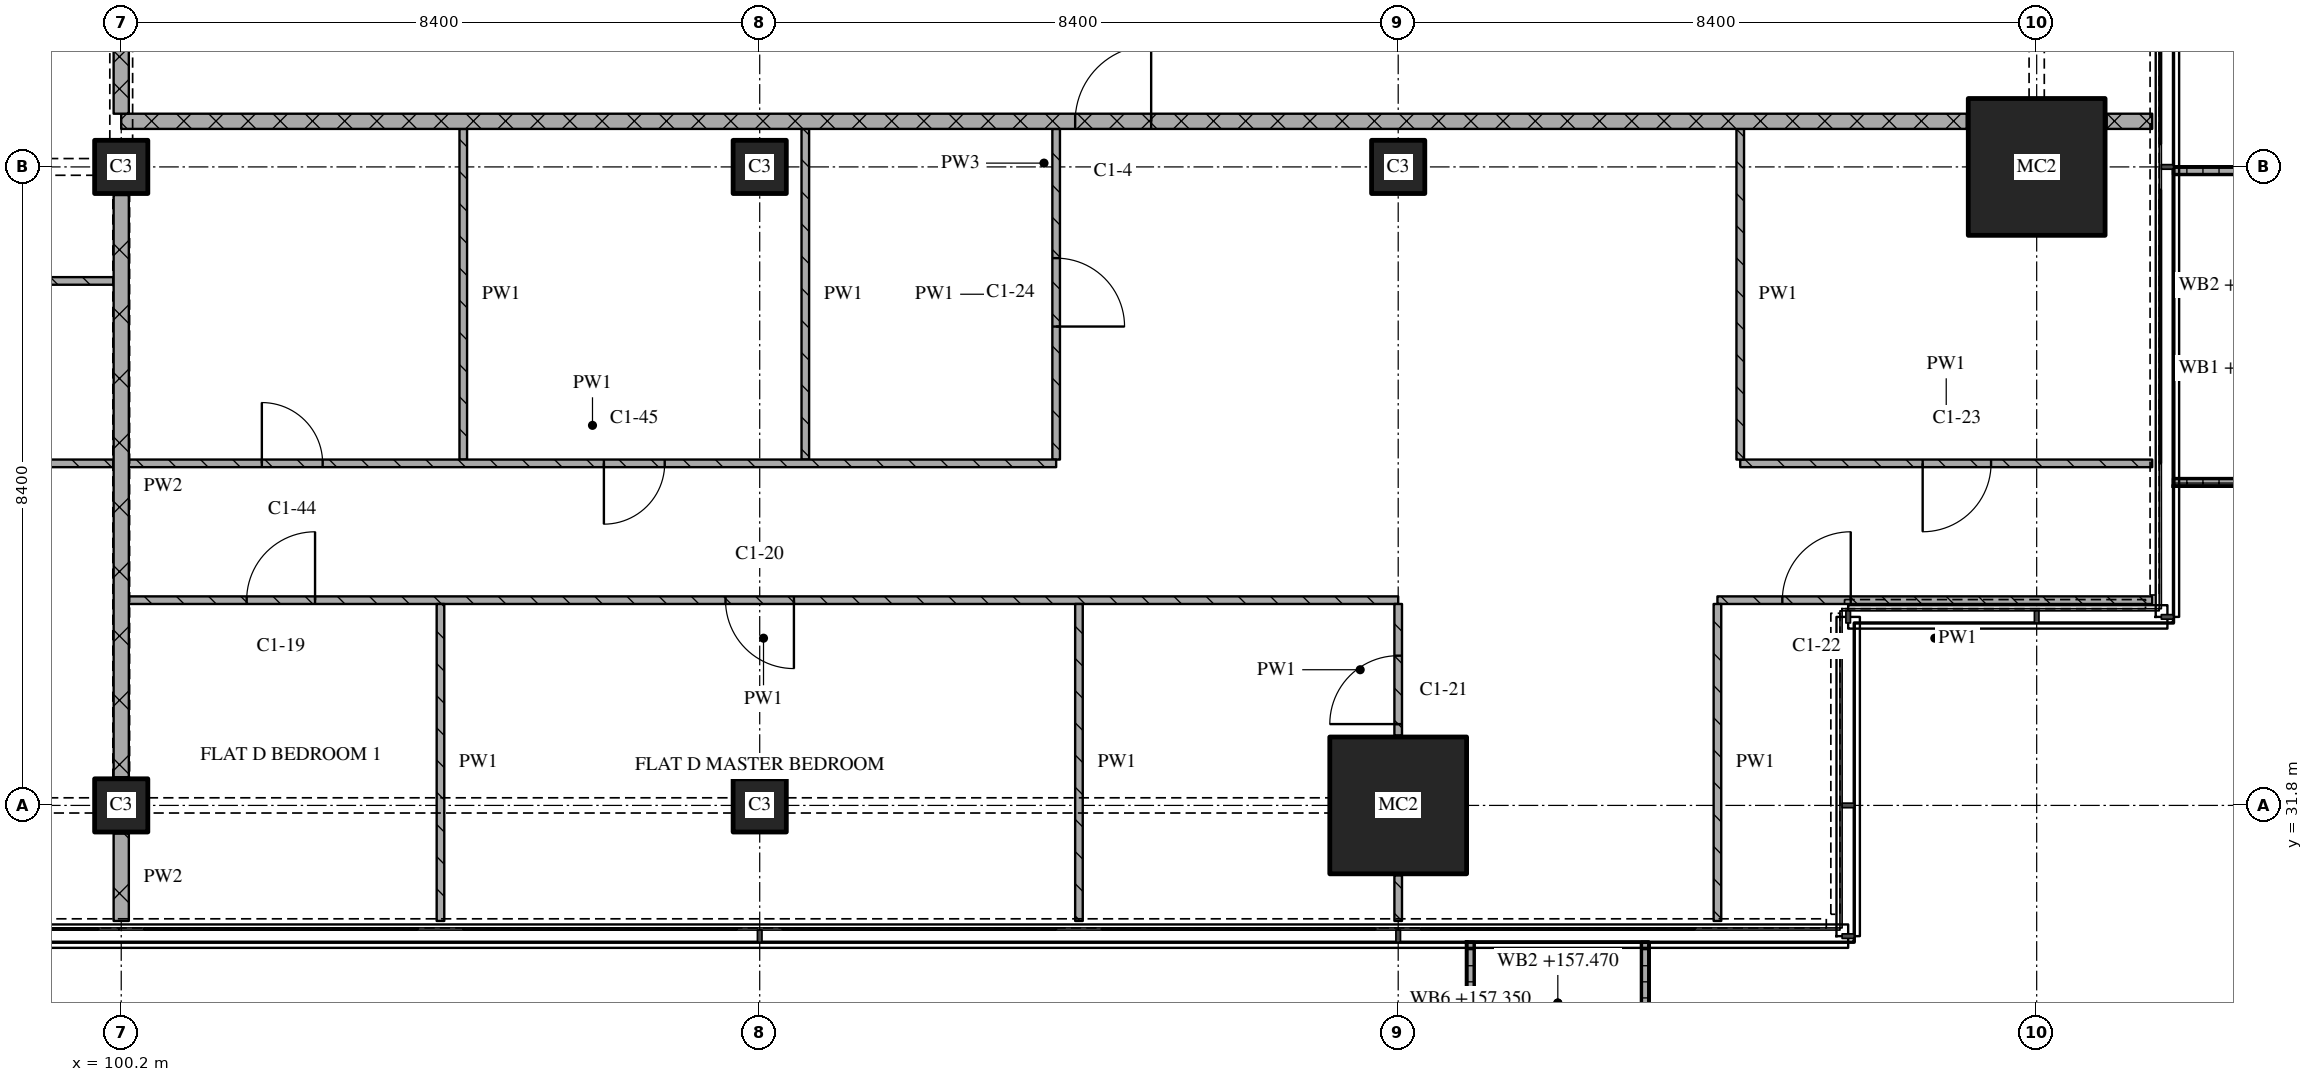
"""IFC4 building model, lengths in metres.
Left out: names, types, materials, properties, quantities, classifications, styles, units other than length and angle.
Written with IfcOpenShell. Run it as: python <this file> out.ifc"""

import sys

from ifc_helpers import new_model, si_unit, direction, frame, frame_2d, origin, origin_2d, place, context, subcontext, project, spatial, polyline, rectangle, outline, extrude, element, fill, save


model = new_model("IFC4")
c1 = context("Model", 3, precision=1e-05, world=origin(), true_north=direction((0.0, 1.0)))
c2 = subcontext(c1, "Body", "Model", "MODEL_VIEW")
j1 = project(units=[si_unit("LENGTHUNIT", "METRE"), si_unit("PLANEANGLEUNIT", "RADIAN")], contexts=[c1])
p1 = place(None, origin())
s1 = spatial("IfcSite", under=j1, at=p1, CompositionType="ELEMENT")
p2 = place(p1, origin())
s2 = spatial("IfcBuilding", under=s1, at=p2, CompositionType="ELEMENT")
p3 = place(p2, frame((0.0, 0.0, 154.65)))
s3 = spatial("IfcBuildingStorey", under=s2, at=p3, CompositionType="ELEMENT", Elevation=154.65)
for number, where, z_axis, x_axis in (
    (1, (100.2, 31.8, 0.0), (0.0, 0.0, 1.0), (1.0, 0.0, 0.0)),
    (2, (100.2, 40.2, 0.0), (0.0, 0.0, 1.0), (1.0, 0.0, 0.0)),
    (3, (108.6, 31.8, 0.0), (0.0, 0.0, 1.0), (1.0, 0.0, 0.0)),
    (4, (108.6, 40.2, 0.0), (0.0, 0.0, 1.0), (1.0, 0.0, 0.0)),
):
    element("IfcColumn", number, at=place(p3, frame(where, z_axis=z_axis, x_axis=x_axis)), inside=s3, PredefinedType="COLUMN", context=c2, shape_type="SweptSolid", body=[
        extrude(rectangle(XDim=0.7, YDim=0.7, at=origin_2d()), origin(), (0.0, 0.0, 1.0), 3.6),
    ])
p4 = place(p3, frame((117.0, 31.8, 0.0), z_axis=(0.0, 0.0, 1.0), x_axis=(1.0, 0.0, 0.0)))
e5 = element("IfcColumn", 5, at=p4, inside=s3, PredefinedType="COLUMN", context=c2, shape_type="SweptSolid", body=[
    extrude(rectangle(XDim=1.8, YDim=1.8, at=origin_2d()), origin(), (0.0, 0.0, 1.0), 3.6),
])
p5 = place(p3, frame((117.0, 40.2, 0.0), z_axis=(0.0, 0.0, 1.0), x_axis=(1.0, 0.0, 0.0)))
e6 = element("IfcColumn", 6, at=p5, inside=s3, PredefinedType="COLUMN", context=c2, shape_type="SweptSolid", body=[
    extrude(rectangle(XDim=0.7, YDim=0.7, at=origin_2d()), origin(), (0.0, 0.0, 1.0), 3.6),
])
p6 = place(p3, frame((125.4, 40.2, 0.0), z_axis=(0.0, 0.0, 1.0), x_axis=(1.0, 0.0, 0.0)))
e7 = element("IfcColumn", 7, at=p6, inside=s3, PredefinedType="COLUMN", context=c2, shape_type="SweptSolid", body=[
    extrude(rectangle(XDim=1.8, YDim=1.8, at=origin_2d()), origin(), (0.0, 0.0, 1.0), 3.6),
])
p7 = place(p3, origin())
e8 = element("IfcWall", 8, at=p7, inside=s3, PredefinedType="SOLIDWALL", context=c2, shape_type="SweptSolid", body=[
    extrude(outline(polyline([(117.9, 30.0), (118.0, 30.0), (118.0, 28.5), (120.2, 28.5), (120.2, 30.0), (120.3, 30.0), (120.3, 28.4), (117.9, 28.4), (117.9, 30.0)])), origin(), (0.0, 0.0, 1.0), 1.0),
])
p8 = place(p3, origin())
e9 = element("IfcWall", 9, at=p8, inside=s3, PredefinedType="SOLIDWALL", context=c2, shape_type="SweptSolid", body=[
    extrude(outline(polyline([(127.2, 36.0), (127.2, 36.1), (128.833, 36.1), (128.833, 40.1), (127.2, 40.1), (127.2, 40.2), (128.933, 40.2), (128.933, 36.0), (127.2, 36.0)])), origin(), (0.0, 0.0, 1.0), 1.0),
])
p9 = place(p3, frame((117.0, 34.5, 0.0), z_axis=(0.0, 0.0, 1.0), x_axis=(-1.0, 0.0, 0.0)))
e10 = element("IfcWall", 10, at=p9, inside=s3, PredefinedType="PARTITIONING", context=c2, shape_type="SweptSolid", body=[
    extrude(rectangle(XDim=16.7, YDim=0.1, at=frame_2d((8.35, 0.0))), origin(), (0.0, 0.0, 1.0), 3.32),
])
p10 = place(p9, frame((7.95, 0.0, 0.0)))
e11 = element("IfcOpeningElement", 11, at=p10, cuts=e10, PredefinedType="OPENING", context=c2, shape_type="SweptSolid", body=[
    extrude(rectangle(XDim=0.9, YDim=2.1, at=frame_2d((0.45, 1.05))), frame((0.0, 0.06, 0.0), z_axis=(0.0, -1.0, 0.0), x_axis=(1.0, 0.0, 0.0)), (0.0, 0.0, 1.0), 0.12),
])
p11 = place(p9, frame((14.25, 0.0, 0.0)))
e12 = element("IfcOpeningElement", 12, at=p11, cuts=e10, PredefinedType="OPENING", context=c2, shape_type="SweptSolid", body=[
    extrude(rectangle(XDim=0.9, YDim=2.1, at=frame_2d((0.45, 1.05))), frame((0.0, 0.06, 0.0), z_axis=(0.0, -1.0, 0.0), x_axis=(1.0, 0.0, 0.0)), (0.0, 0.0, 1.0), 0.12),
])
p12 = place(p3, frame((126.92, 34.5, 0.0), z_axis=(0.0, 0.0, 1.0), x_axis=(-1.0, 0.0, 0.0)))
e13 = element("IfcWall", 13, at=p12, inside=s3, PredefinedType="PARTITIONING", context=c2, shape_type="SweptSolid", body=[
    extrude(rectangle(XDim=5.72, YDim=0.1, at=frame_2d((2.86, 0.0))), origin(), (0.0, 0.0, 1.0), 3.32),
])
p13 = place(p12, frame((3.966, 0.0, 0.0)))
e14 = element("IfcOpeningElement", 14, at=p13, cuts=e13, PredefinedType="OPENING", context=c2, shape_type="SweptSolid", body=[
    extrude(rectangle(XDim=0.9, YDim=2.1, at=frame_2d((0.45, 1.05))), frame((0.0, 0.06, 0.0), z_axis=(0.0, -1.0, 0.0), x_axis=(1.0, 0.0, 0.0)), (0.0, 0.0, 1.0), 0.12),
])
p14 = place(p3, frame((121.5, 36.3, 0.0), z_axis=(0.0, 0.0, 1.0), x_axis=(1.0, 0.0, 0.0)))
e15 = element("IfcWall", 15, at=p14, inside=s3, PredefinedType="PARTITIONING", context=c2, shape_type="SweptSolid", body=[
    extrude(rectangle(XDim=5.42, YDim=0.1, at=frame_2d((2.71, 0.0))), origin(), (0.0, 0.0, 1.0), 3.32),
])
p15 = place(p14, frame((2.4, 0.0, 0.0)))
e16 = element("IfcOpeningElement", 16, at=p15, cuts=e15, PredefinedType="OPENING", context=c2, shape_type="SweptSolid", body=[
    extrude(rectangle(XDim=0.9, YDim=2.1, at=frame_2d((0.45, 1.05))), frame((0.0, 0.06, 0.0), z_axis=(0.0, -1.0, 0.0), x_axis=(1.0, 0.0, 0.0)), (0.0, 0.0, 1.0), 0.12),
])
p16 = place(p3, frame((93.0, 38.7, 0.0), z_axis=(0.0, 0.0, 1.0), x_axis=(1.0, 0.0, 0.0)))
e17 = element("IfcWall", 17, at=p16, inside=s3, PredefinedType="PARTITIONING", context=c2, shape_type="SweptSolid", body=[
    extrude(rectangle(XDim=7.1, YDim=0.1, at=frame_2d((3.55, 0.0))), origin(), (0.0, 0.0, 1.0), 3.32),
])
p17 = place(p16, frame((5.45, 0.0, 0.0)))
e18 = element("IfcOpeningElement", 18, at=p17, cuts=e17, PredefinedType="OPENING", context=c2, shape_type="SweptSolid", body=[
    extrude(rectangle(XDim=0.8, YDim=2.1, at=frame_2d((0.4, 1.05))), frame((0.0, 0.06, 0.0), z_axis=(0.0, -1.0, 0.0), x_axis=(1.0, 0.0, 0.0)), (0.0, 0.0, 1.0), 0.12),
])
p18 = place(p3, frame((124.48, 40.8, 0.0), z_axis=(0.0, 0.0, 1.0), x_axis=(-1.0, 0.0, 0.0)))
e19 = element("IfcWall", 19, at=p18, inside=s3, PredefinedType="PARTITIONING", context=c2, shape_type="SweptSolid", body=[
    extrude(rectangle(XDim=24.28, YDim=0.2, at=frame_2d((12.14, 0.0))), origin(), (0.0, 0.0, 1.0), 3.32),
])
p19 = place(p18, frame((10.73, 0.0, 0.0)))
e20 = element("IfcOpeningElement", 20, at=p19, cuts=e19, PredefinedType="OPENING", context=c2, shape_type="SweptSolid", body=[
    extrude(rectangle(XDim=1.0, YDim=2.1, at=frame_2d((0.5, 1.05))), frame((0.0, 0.11, 0.0), z_axis=(0.0, -1.0, 0.0), x_axis=(1.0, 0.0, 0.0)), (0.0, 0.0, 1.0), 0.22),
])
p20 = place(p3, frame((126.32, 40.8, 0.0), z_axis=(0.0, 0.0, 1.0), x_axis=(1.0, 0.0, 0.0)))
e21 = element("IfcWall", 21, at=p20, inside=s3, PredefinedType="PARTITIONING", context=c2, shape_type="SweptSolid", body=[
    extrude(rectangle(XDim=0.6, YDim=0.2, at=frame_2d((0.3, 0.0))), origin(), (0.0, 0.0, 1.0), 3.32),
])
p21 = place(p3, frame((100.2, 43.1, 0.0), z_axis=(0.0, 0.0, 1.0), x_axis=(0.0, -1.0, 0.0)))
e22 = element("IfcWall", 22, at=p21, inside=s3, PredefinedType="PARTITIONING", context=c2, shape_type="SweptSolid", body=[
    extrude(rectangle(XDim=2.2, YDim=0.2, at=frame_2d((1.1, 0.0))), origin(), (0.0, 0.0, 1.0), 2.43),
])
p22 = place(p3, frame((100.2, 31.43, 0.0), z_axis=(0.0, 0.0, 1.0), x_axis=(0.0, -1.0, 0.0)))
e23 = element("IfcWall", 23, at=p22, inside=s3, PredefinedType="PARTITIONING", context=c2, shape_type="SweptSolid", body=[
    extrude(rectangle(XDim=1.15, YDim=0.2, at=frame_2d((0.575, 0.0))), origin(), (0.0, 0.0, 1.0), 3.32),
])
p23 = place(p3, frame((100.2, 39.83, 0.0), z_axis=(0.0, 0.0, 1.0), x_axis=(0.0, -1.0, 0.0)))
e24 = element("IfcWall", 24, at=p23, inside=s3, PredefinedType="PARTITIONING", context=c2, shape_type="SweptSolid", body=[
    extrude(rectangle(XDim=7.66, YDim=0.2, at=frame_2d((3.83, 0.0))), origin(), (0.0, 0.0, 1.0), 2.72),
])
p24 = place(p3, frame((104.4, 34.45, 0.0), z_axis=(0.0, 0.0, 1.0), x_axis=(0.0, -1.0, 0.0)))
e25 = element("IfcWall", 25, at=p24, inside=s3, PredefinedType="PARTITIONING", context=c2, shape_type="SweptSolid", body=[
    extrude(rectangle(XDim=4.17, YDim=0.1, at=frame_2d((2.085, 0.0))), origin(), (0.0, 0.0, 1.0), 3.32),
])
for number, where, z_axis, x_axis in (
    (26, (104.7, 40.7, 0.0), (0.0, 0.0, 1.0), (0.0, -1.0, 0.0)),
    (27, (109.2, 40.7, 0.0), (0.0, 0.0, 1.0), (0.0, -1.0, 0.0)),
):
    element("IfcWall", number, at=place(p3, frame(where, z_axis=z_axis, x_axis=x_axis)), inside=s3, PredefinedType="PARTITIONING", context=c2, shape_type="SweptSolid", body=[
        extrude(rectangle(XDim=4.35, YDim=0.1, at=frame_2d((2.175, 0.0))), origin(), (0.0, 0.0, 1.0), 3.32),
    ])
p25 = place(p3, frame((112.5, 36.35, 0.0), z_axis=(0.0, 0.0, 1.0), x_axis=(0.0, 1.0, 0.0)))
e28 = element("IfcWall", 28, at=p25, inside=s3, PredefinedType="PARTITIONING", context=c2, shape_type="SweptSolid", body=[
    extrude(rectangle(XDim=4.35, YDim=0.1, at=frame_2d((2.175, 0.0))), origin(), (0.0, 0.0, 1.0), 3.32),
])
p26 = place(p25, frame((1.75, 0.0, 0.0)))
e29 = element("IfcOpeningElement", 29, at=p26, cuts=e28, PredefinedType="OPENING", context=c2, shape_type="SweptSolid", body=[
    extrude(rectangle(XDim=0.9, YDim=2.1, at=frame_2d((0.45, 1.05))), frame((0.0, 0.06, 0.0), z_axis=(0.0, -1.0, 0.0), x_axis=(1.0, 0.0, 0.0)), (0.0, 0.0, 1.0), 0.12),
])
p27 = place(p3, frame((112.8, 34.45, 0.0), z_axis=(0.0, 0.0, 1.0), x_axis=(0.0, -1.0, 0.0)))
e30 = element("IfcWall", 30, at=p27, inside=s3, PredefinedType="PARTITIONING", context=c2, shape_type="SweptSolid", body=[
    extrude(rectangle(XDim=4.17, YDim=0.1, at=frame_2d((2.085, 0.0))), origin(), (0.0, 0.0, 1.0), 3.32),
])
p28 = place(p3, frame((117.0, 30.88, 0.0), z_axis=(0.0, 0.0, 1.0), x_axis=(0.0, -1.0, 0.0)))
e31 = element("IfcWall", 31, at=p28, inside=s3, PredefinedType="PARTITIONING", context=c2, shape_type="SweptSolid", body=[
    extrude(rectangle(XDim=0.6, YDim=0.1, at=frame_2d((0.3, 0.0))), origin(), (0.0, 0.0, 1.0), 3.32),
])
p29 = place(p3, frame((117.0, 32.72, 0.0), z_axis=(0.0, 0.0, 1.0), x_axis=(0.0, 1.0, 0.0)))
e32 = element("IfcWall", 32, at=p29, inside=s3, PredefinedType="PARTITIONING", context=c2, shape_type="SweptSolid", body=[
    extrude(rectangle(XDim=1.73, YDim=0.1, at=frame_2d((0.865, 0.0))), origin(), (0.0, 0.0, 1.0), 3.32),
])
p30 = place(p29, frame((0.15, 0.0, 0.0)))
e33 = element("IfcOpeningElement", 33, at=p30, cuts=e32, PredefinedType="OPENING", context=c2, shape_type="SweptSolid", body=[
    extrude(rectangle(XDim=0.9, YDim=2.1, at=frame_2d((0.45, 1.05))), frame((0.0, 0.06, 0.0), z_axis=(0.0, -1.0, 0.0), x_axis=(1.0, 0.0, 0.0)), (0.0, 0.0, 1.0), 0.12),
])
p31 = place(p3, frame((121.2, 34.45, 0.0), z_axis=(0.0, 0.0, 1.0), x_axis=(0.0, -1.0, 0.0)))
e34 = element("IfcWall", 34, at=p31, inside=s3, PredefinedType="PARTITIONING", context=c2, shape_type="SweptSolid", body=[
    extrude(rectangle(XDim=4.17, YDim=0.1, at=frame_2d((2.085, 0.0))), origin(), (0.0, 0.0, 1.0), 3.32),
])
p32 = place(p3, frame((121.5, 40.7, 0.0), z_axis=(0.0, 0.0, 1.0), x_axis=(0.0, -1.0, 0.0)))
e35 = element("IfcWall", 35, at=p32, inside=s3, PredefinedType="PARTITIONING", context=c2, shape_type="SweptSolid", body=[
    extrude(rectangle(XDim=4.35, YDim=0.1, at=frame_2d((2.175, 0.0))), origin(), (0.0, 0.0, 1.0), 3.32),
])
p33 = place(p3, frame((100.1, 36.3, 0.0), z_axis=(0.0, 0.0, 1.0), x_axis=(-1.0, 0.0, 0.0)))
e36 = element("IfcWall", 36, at=p33, inside=s3, PredefinedType="PARTITIONING", context=c2, shape_type="SweptSolid", body=[
    extrude(rectangle(XDim=12.5, YDim=0.1, at=frame_2d((6.25, 0.0))), origin(), (0.0, 0.0, 1.0), 3.32),
])
p34 = place(p33, frame((3.65, 0.0, 0.0)))
e37 = element("IfcOpeningElement", 37, at=p34, cuts=e36, PredefinedType="OPENING", context=c2, shape_type="SweptSolid", body=[
    extrude(rectangle(XDim=0.9, YDim=2.1, at=frame_2d((0.45, 1.05))), frame((0.0, 0.06, 0.0), z_axis=(0.0, -1.0, 0.0), x_axis=(1.0, 0.0, 0.0)), (0.0, 0.0, 1.0), 0.12),
])
p35 = place(p33, frame((9.95, 0.0, 0.0)))
e38 = element("IfcOpeningElement", 38, at=p35, cuts=e36, PredefinedType="OPENING", context=c2, shape_type="SweptSolid", body=[
    extrude(rectangle(XDim=0.9, YDim=2.1, at=frame_2d((0.45, 1.05))), frame((0.0, 0.06, 0.0), z_axis=(0.0, -1.0, 0.0), x_axis=(1.0, 0.0, 0.0)), (0.0, 0.0, 1.0), 0.12),
])
p36 = place(p3, frame((100.3, 36.3, 0.0), z_axis=(0.0, 0.0, 1.0), x_axis=(1.0, 0.0, 0.0)))
e39 = element("IfcWall", 39, at=p36, inside=s3, PredefinedType="PARTITIONING", context=c2, shape_type="SweptSolid", body=[
    extrude(rectangle(XDim=12.2, YDim=0.1, at=frame_2d((6.1, 0.0))), origin(), (0.0, 0.0, 1.0), 3.32),
])
p37 = place(p36, frame((1.75, 0.0, 0.0)))
e40 = element("IfcOpeningElement", 40, at=p37, cuts=e39, PredefinedType="OPENING", context=c2, shape_type="SweptSolid", body=[
    extrude(rectangle(XDim=0.8, YDim=2.1, at=frame_2d((0.4, 1.05))), frame((0.0, 0.06, 0.0), z_axis=(0.0, -1.0, 0.0), x_axis=(1.0, 0.0, 0.0)), (0.0, 0.0, 1.0), 0.12),
])
p38 = place(p36, frame((6.25, 0.0, 0.0)))
e41 = element("IfcOpeningElement", 41, at=p38, cuts=e39, PredefinedType="OPENING", context=c2, shape_type="SweptSolid", body=[
    extrude(rectangle(XDim=0.8, YDim=2.1, at=frame_2d((0.4, 1.05))), frame((0.0, 0.06, 0.0), z_axis=(0.0, -1.0, 0.0), x_axis=(1.0, 0.0, 0.0)), (0.0, 0.0, 1.0), 0.12),
])
p39 = place(p10, origin())
e42 = element("IfcDoor", 42, at=p39, inside=s3, OperationType="SINGLE_SWING_LEFT", PredefinedType="DOOR", context=c2, shape_type="SweptSolid", body=[
    extrude(rectangle(XDim=0.9, YDim=2.1, at=frame_2d((0.45, 1.05))), frame((0.0, 0.025, 0.0), z_axis=(0.0, -1.0, 0.0), x_axis=(1.0, 0.0, 0.0)), (0.0, 0.0, 1.0), 0.05),
])
fill(e11, e42)
p40 = place(p11, origin())
e43 = element("IfcDoor", 43, at=p40, inside=s3, OperationType="SINGLE_SWING_RIGHT", PredefinedType="DOOR", context=c2, shape_type="SweptSolid", body=[
    extrude(rectangle(XDim=0.9, YDim=2.1, at=frame_2d((0.45, 1.05))), frame((0.0, 0.025, 0.0), z_axis=(0.0, -1.0, 0.0), x_axis=(1.0, 0.0, 0.0)), (0.0, 0.0, 1.0), 0.05),
])
fill(e12, e43)
p41 = place(p13, origin())
e44 = element("IfcDoor", 44, at=p41, inside=s3, OperationType="SINGLE_SWING_RIGHT", PredefinedType="DOOR", context=c2, shape_type="SweptSolid", body=[
    extrude(rectangle(XDim=0.9, YDim=2.1, at=frame_2d((0.45, 1.05))), frame((0.0, 0.025, 0.0), z_axis=(0.0, -1.0, 0.0), x_axis=(1.0, 0.0, 0.0)), (0.0, 0.0, 1.0), 0.05),
])
fill(e14, e44)
p42 = place(p15, origin())
e45 = element("IfcDoor", 45, at=p42, inside=s3, OperationType="SINGLE_SWING_RIGHT", PredefinedType="DOOR", context=c2, shape_type="SweptSolid", body=[
    extrude(rectangle(XDim=0.9, YDim=2.1, at=frame_2d((0.45, 1.05))), frame((0.0, 0.025, 0.0), z_axis=(0.0, -1.0, 0.0), x_axis=(1.0, 0.0, 0.0)), (0.0, 0.0, 1.0), 0.05),
])
fill(e16, e45)
p43 = place(p19, origin())
e46 = element("IfcDoor", 46, at=p43, inside=s3, OperationType="SINGLE_SWING_RIGHT", PredefinedType="DOOR", context=c2, shape_type="SweptSolid", body=[
    extrude(rectangle(XDim=1.0, YDim=2.1, at=frame_2d((0.5, 1.05))), frame((0.0, 0.025, 0.0), z_axis=(0.0, -1.0, 0.0), x_axis=(1.0, 0.0, 0.0)), (0.0, 0.0, 1.0), 0.05),
])
fill(e20, e46)
p44 = place(p26, origin())
e47 = element("IfcDoor", 47, at=p44, inside=s3, OperationType="SINGLE_SWING_RIGHT", PredefinedType="DOOR", context=c2, shape_type="SweptSolid", body=[
    extrude(rectangle(XDim=0.9, YDim=2.1, at=frame_2d((0.45, 1.05))), frame((0.0, 0.025, 0.0), z_axis=(0.0, -1.0, 0.0), x_axis=(1.0, 0.0, 0.0)), (0.0, 0.0, 1.0), 0.05),
])
fill(e29, e47)
p45 = place(p30, origin())
e48 = element("IfcDoor", 48, at=p45, inside=s3, OperationType="SINGLE_SWING_LEFT", PredefinedType="DOOR", context=c2, shape_type="SweptSolid", body=[
    extrude(rectangle(XDim=0.9, YDim=2.1, at=frame_2d((0.45, 1.05))), frame((0.0, 0.025, 0.0), z_axis=(0.0, -1.0, 0.0), x_axis=(1.0, 0.0, 0.0)), (0.0, 0.0, 1.0), 0.05),
])
fill(e33, e48)
p46 = place(p37, origin())
e49 = element("IfcDoor", 49, at=p46, inside=s3, OperationType="SINGLE_SWING_LEFT", PredefinedType="DOOR", context=c2, shape_type="SweptSolid", body=[
    extrude(rectangle(XDim=0.8, YDim=2.1, at=frame_2d((0.4, 1.05))), frame((0.0, 0.025, 0.0), z_axis=(0.0, -1.0, 0.0), x_axis=(1.0, 0.0, 0.0)), (0.0, 0.0, 1.0), 0.05),
])
fill(e40, e49)
p47 = place(p38, origin())
e50 = element("IfcDoor", 50, at=p47, inside=s3, OperationType="SINGLE_SWING_RIGHT", PredefinedType="DOOR", context=c2, shape_type="SweptSolid", body=[
    extrude(rectangle(XDim=0.8, YDim=2.1, at=frame_2d((0.4, 1.05))), frame((0.0, 0.025, 0.0), z_axis=(0.0, -1.0, 0.0), x_axis=(1.0, 0.0, 0.0)), (0.0, 0.0, 1.0), 0.05),
])
fill(e41, e50)
save(model, sys.argv[1])
